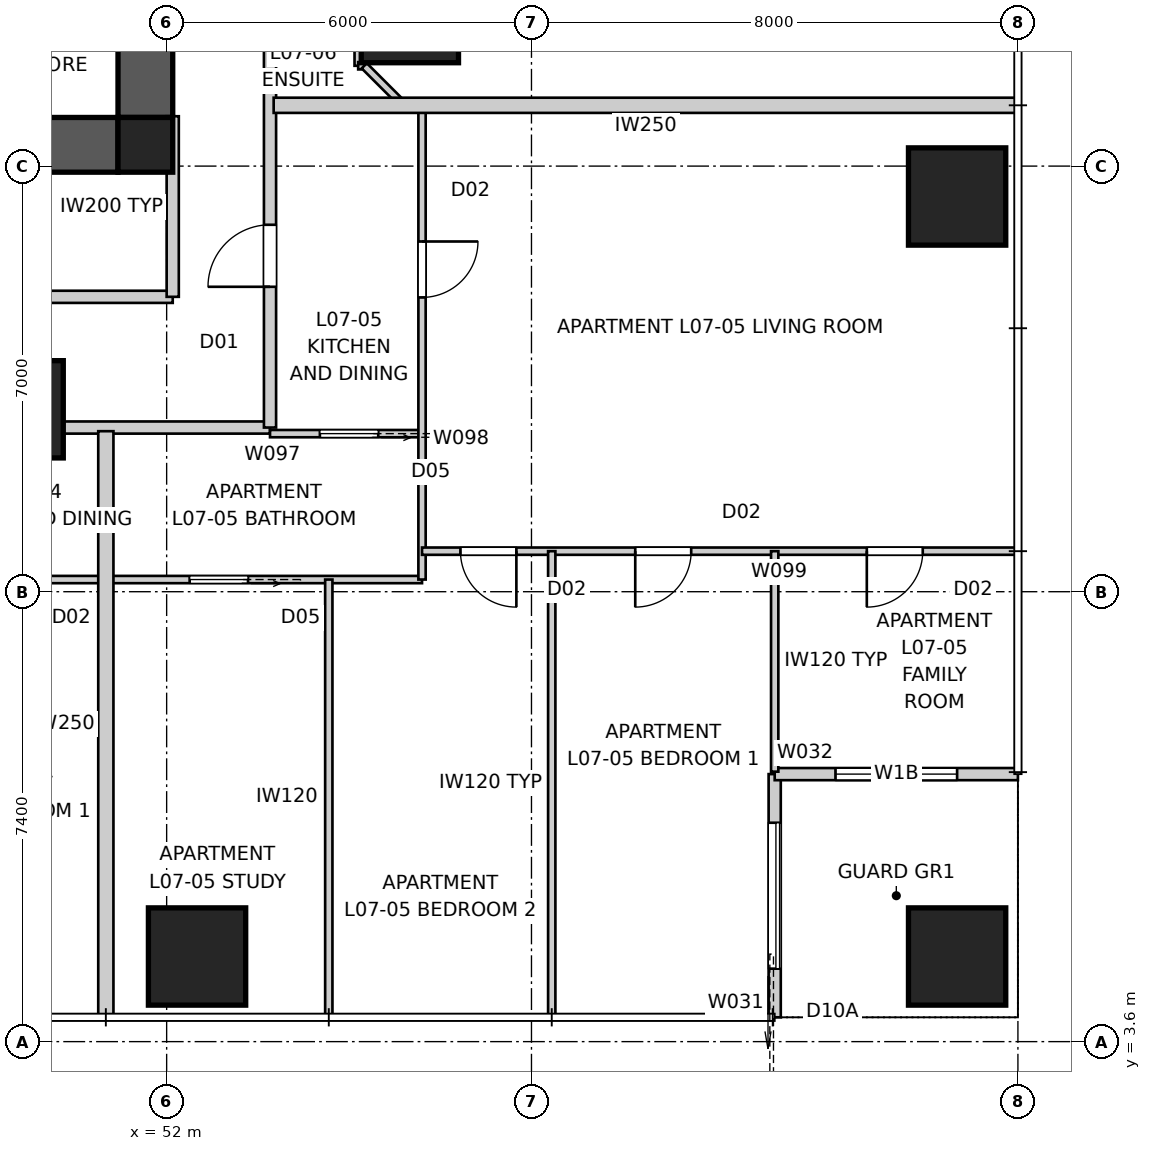
"""IFC4 building model, lengths in metres.
Left out: names, types, materials, properties, quantities, classifications, styles, units other than length and angle.
Written with IfcOpenShell. Run it as: python <this file> out.ifc"""

import sys

from ifc_helpers import new_model, si_unit, direction, frame, frame_2d, origin, origin_2d, place, context, subcontext, project, spatial, polyline, rectangle, outline, extrude, element, fill, save


model = new_model("IFC4")
c1 = context("Model", 3, precision=1e-05, world=origin(), true_north=direction((0.0, 1.0)))
c2 = subcontext(c1, "Body", "Model", "MODEL_VIEW")
j1 = project(units=[si_unit("LENGTHUNIT", "METRE"), si_unit("PLANEANGLEUNIT", "RADIAN")], contexts=[c1])
p1 = place(None, origin())
s1 = spatial("IfcSite", under=j1, at=p1, CompositionType="ELEMENT")
p2 = place(p1, origin())
s2 = spatial("IfcBuilding", under=s1, at=p2, CompositionType="ELEMENT")
p3 = place(p2, frame((0.0, 0.0, 28.6)))
s3 = spatial("IfcBuildingStorey", under=s2, at=p3, CompositionType="ELEMENT", Elevation=28.6)
p4 = place(p3, frame((51.2, 18.35, 0.0), z_axis=(0.0, 0.0, 1.0), x_axis=(-1.0, 0.0, 0.0)))
e1 = element("IfcWall", 1, at=p4, inside=s3, PredefinedType="SHEAR", context=c2, shape_type="SweptSolid", body=[
    extrude(outline(polyline([(0.0, -0.45), (22.4, -0.45), (22.4, -0.025), (22.85, -0.025), (22.85, 0.025), (22.4, 0.025), (22.4, 0.45), (0.0, 0.45), (0.0, 0.025), (-0.45, 0.025), (-0.45, -0.025), (0.0, -0.025), (0.0, -0.45)])), origin(), (0.0, 0.0, 1.0), 3.4),
])
p5 = place(p3, frame((51.65, 18.8, 0.0), z_axis=(0.0, 0.0, 1.0), x_axis=(0.0, 1.0, 0.0)))
e2 = element("IfcWall", 2, at=p5, inside=s3, PredefinedType="SHEAR", context=c2, shape_type="SweptSolid", body=[
    extrude(outline(polyline([(0.0, -0.45), (22.4, -0.45), (22.4, -0.025), (22.85, -0.025), (22.85, 0.025), (22.4, 0.025), (22.4, 0.45), (0.0, 0.45), (0.0, 0.025), (-0.45, 0.025), (-0.45, -0.025), (0.0, -0.025), (0.0, -0.45)])), origin(), (0.0, 0.0, 1.0), 3.4),
])
p6 = place(p5, frame((11.14, 0.0, 0.0)))
e3 = element("IfcOpeningElement", 3, at=p6, cuts=e2, PredefinedType="OPENING", context=c2, shape_type="SweptSolid", body=[
    extrude(rectangle(XDim=1.02, YDim=2.4, at=frame_2d((0.51, 1.2))), frame((0.0, 0.46, 0.0), z_axis=(0.0, -1.0, 0.0), x_axis=(1.0, 0.0, 0.0)), (0.0, 0.0, 1.0), 0.92),
])
p7 = place(p3, frame((51.65, 18.35, 0.0), z_axis=(0.0, 0.0, 1.0), x_axis=(1.0, 0.0, 0.0)))
e4 = element("IfcColumn", 4, at=p7, inside=s3, PredefinedType="COLUMN", context=c2, shape_type="SweptSolid", body=[
    extrude(rectangle(XDim=0.9, YDim=0.9, at=origin_2d()), origin(), (0.0, 0.0, 1.0), 3.4),
])
for number, where, z_axis, x_axis in (
    (5, (52.5, 5.0, 0.0), (0.0, 0.0, 1.0), (1.0, 0.0, 0.0)),
    (6, (65.0, 5.0, 0.0), (0.0, 0.0, 1.0), (1.0, 0.0, 0.0)),
    (7, (65.0, 17.5, 0.0), (0.0, 0.0, 1.0), (1.0, 0.0, 0.0)),
    (8, (49.5, 14.0, 0.0), (0.0, 0.0, 1.0), (1.0, 0.0, 0.0)),
    (9, (56.0, 20.5, 0.0), (0.0, 0.0, 1.0), (1.0, 0.0, 0.0)),
):
    element("IfcColumn", number, at=place(p3, frame(where, z_axis=z_axis, x_axis=x_axis)), inside=s3, PredefinedType="COLUMN", context=c2, shape_type="SweptSolid", body=[
        extrude(rectangle(XDim=1.6, YDim=1.6, at=origin_2d()), origin(), (0.0, 0.0, 1.0), 3.4),
    ])
p8 = place(p3, frame((62.0, 4.0, 0.0), z_axis=(0.0, 0.0, 1.0), x_axis=(0.0, 1.0, 0.0)))
e10 = element("IfcWall", 10, at=p8, inside=s3, PredefinedType="SOLIDWALL", context=c2, shape_type="SweptSolid", body=[
    extrude(rectangle(XDim=4.0, YDim=0.2, at=frame_2d((2.0, 0.0))), origin(), (0.0, 0.0, 1.0), 3.25),
])
p9 = place(p8, frame((0.8, 0.0, 0.0)))
e11 = element("IfcOpeningElement", 11, at=p9, cuts=e10, PredefinedType="OPENING", context=c2, shape_type="SweptSolid", body=[
    extrude(rectangle(XDim=2.4, YDim=2.1, at=frame_2d((1.2, 1.05))), frame((0.0, 0.11, 0.0), z_axis=(0.0, -1.0, 0.0), x_axis=(1.0, 0.0, 0.0)), (0.0, 0.0, 1.0), 0.22),
])
p10 = place(p3, frame((62.0, 8.0, 0.0), z_axis=(0.0, 0.0, 1.0), x_axis=(1.0, 0.0, 0.0)))
e12 = element("IfcWall", 12, at=p10, inside=s3, PredefinedType="SOLIDWALL", context=c2, shape_type="SweptSolid", body=[
    extrude(rectangle(XDim=4.0, YDim=0.2, at=frame_2d((2.0, 0.0))), origin(), (0.0, 0.0, 1.0), 3.25),
])
p11 = place(p10, frame((1.0, 0.0, 0.45)))
e13 = element("IfcOpeningElement", 13, at=p11, cuts=e12, PredefinedType="OPENING", context=c2, shape_type="SweptSolid", body=[
    extrude(rectangle(XDim=2.0, YDim=1.8, at=frame_2d((1.0, 0.9))), frame((0.0, 0.11, 0.0), z_axis=(0.0, -1.0, 0.0), x_axis=(1.0, 0.0, 0.0)), (0.0, 0.0, 1.0), 0.22),
])
p12 = place(p3, frame((49.242, 13.7, 0.0), z_axis=(0.0, 0.0, 1.0), x_axis=(1.0, 0.0, 0.0)))
e14 = element("IfcWall", 14, at=p12, inside=s3, PredefinedType="PARTITIONING", context=c2, shape_type="SweptSolid", body=[
    extrude(rectangle(XDim=4.458, YDim=0.2, at=frame_2d((2.229, 0.0))), origin(), (0.0, 0.0, 1.0), 3.25),
])
p13 = place(p3, frame((53.7, 13.7, 0.0), z_axis=(0.0, 0.0, 1.0), x_axis=(0.0, 1.0, 0.0)))
e15 = element("IfcWall", 15, at=p13, inside=s3, PredefinedType="PARTITIONING", context=c2, shape_type="SweptSolid", body=[
    extrude(rectangle(XDim=32.6, YDim=0.2, at=frame_2d((16.3, 0.0))), origin(), (0.0, 0.0, 1.0), 3.25),
])
p14 = place(p13, frame((2.315, 0.0, 0.0)))
e16 = element("IfcOpeningElement", 16, at=p14, cuts=e15, PredefinedType="OPENING", context=c2, shape_type="SweptSolid", body=[
    extrude(rectangle(XDim=1.02, YDim=2.34, at=frame_2d((0.51, 1.17))), frame((0.0, 0.11, 0.0), z_axis=(0.0, -1.0, 0.0), x_axis=(1.0, 0.0, 0.0)), (0.0, 0.0, 1.0), 0.22),
])
p15 = place(p13, frame((29.265, 0.0, 0.0)))
e17 = element("IfcOpeningElement", 17, at=p15, cuts=e15, PredefinedType="OPENING", context=c2, shape_type="SweptSolid", body=[
    extrude(rectangle(XDim=1.02, YDim=2.34, at=frame_2d((0.51, 1.17))), frame((0.0, 0.11, 0.0), z_axis=(0.0, -1.0, 0.0), x_axis=(1.0, 0.0, 0.0)), (0.0, 0.0, 1.0), 0.22),
])
p16 = place(p13, frame((20.646, 0.0, 0.0)))
e18 = element("IfcOpeningElement", 18, at=p16, cuts=e15, PredefinedType="OPENING", context=c2, shape_type="SweptSolid", body=[
    extrude(rectangle(XDim=1.02, YDim=2.34, at=frame_2d((0.51, 1.17))), frame((0.0, 0.11, 0.0), z_axis=(0.0, -1.0, 0.0), x_axis=(1.0, 0.0, 0.0)), (0.0, 0.0, 1.0), 0.22),
])
p17 = place(p13, frame((13.626, 0.0, 0.0)))
e19 = element("IfcOpeningElement", 19, at=p17, cuts=e15, PredefinedType="OPENING", context=c2, shape_type="SweptSolid", body=[
    extrude(rectangle(XDim=1.02, YDim=2.34, at=frame_2d((0.51, 1.17))), frame((0.0, 0.11, 0.0), z_axis=(0.0, -1.0, 0.0), x_axis=(1.0, 0.0, 0.0)), (0.0, 0.0, 1.0), 0.22),
])
p18 = place(p3, frame((51.0, 4.0, 0.0), z_axis=(0.0, 0.0, 1.0), x_axis=(0.0, 1.0, 0.0)))
e20 = element("IfcWall", 20, at=p18, inside=s3, PredefinedType="PARTITIONING", context=c2, shape_type="SweptSolid", body=[
    extrude(rectangle(XDim=9.64, YDim=0.25, at=frame_2d((4.82, 0.0))), origin(), (0.0, 0.0, 1.0), 3.25),
])
p19 = place(p3, frame((66.0, 19.0, 0.0), z_axis=(0.0, 0.0, 1.0), x_axis=(-1.0, 0.0, 0.0)))
e21 = element("IfcWall", 21, at=p19, inside=s3, PredefinedType="PARTITIONING", context=c2, shape_type="SweptSolid", body=[
    extrude(rectangle(XDim=12.24, YDim=0.25, at=frame_2d((6.12, 0.0))), origin(), (0.0, 0.0, 1.0), 3.25),
])
p20 = place(p3, frame((27.9, 15.85, 0.0), z_axis=(0.0, 0.0, 1.0), x_axis=(1.0, 0.0, 0.0)))
e22 = element("IfcWall", 22, at=p20, inside=s3, PredefinedType="PARTITIONING", context=c2, shape_type="SweptSolid", body=[
    extrude(rectangle(XDim=24.2, YDim=0.2, at=frame_2d((12.1, 0.0))), origin(), (0.0, 0.0, 1.0), 3.25),
])
p21 = place(p20, frame((12.437, 0.0, 0.0)))
e23 = element("IfcOpeningElement", 23, at=p21, cuts=e22, PredefinedType="OPENING", context=c2, shape_type="SweptSolid", body=[
    extrude(rectangle(XDim=1.02, YDim=2.1, at=frame_2d((0.51, 1.05))), frame((0.0, 0.11, 0.0), z_axis=(0.0, -1.0, 0.0), x_axis=(1.0, 0.0, 0.0)), (0.0, 0.0, 1.0), 0.22),
])
p22 = place(p20, frame((3.544, 0.0, 0.0)))
e24 = element("IfcOpeningElement", 24, at=p22, cuts=e22, PredefinedType="OPENING", context=c2, shape_type="SweptSolid", body=[
    extrude(rectangle(XDim=1.02, YDim=2.1, at=frame_2d((0.51, 1.05))), frame((0.0, 0.11, 0.0), z_axis=(0.0, -1.0, 0.0), x_axis=(1.0, 0.0, 0.0)), (0.0, 0.0, 1.0), 0.22),
])
p23 = place(p20, frame((19.733, 0.0, 0.0)))
e25 = element("IfcOpeningElement", 25, at=p23, cuts=e22, PredefinedType="OPENING", context=c2, shape_type="SweptSolid", body=[
    extrude(rectangle(XDim=1.02, YDim=2.1, at=frame_2d((0.51, 1.05))), frame((0.0, 0.11, 0.0), z_axis=(0.0, -1.0, 0.0), x_axis=(1.0, 0.0, 0.0)), (0.0, 0.0, 1.0), 0.22),
])
p24 = place(p3, frame((52.1, 15.85, 0.0), z_axis=(0.0, 0.0, 1.0), x_axis=(0.0, 1.0, 0.0)))
e26 = element("IfcWall", 26, at=p24, inside=s3, PredefinedType="PARTITIONING", context=c2, shape_type="SweptSolid", body=[
    extrude(rectangle(XDim=2.97, YDim=0.2, at=frame_2d((1.485, 0.0))), origin(), (0.0, 0.0, 1.0), 3.25),
])
p25 = place(p3, frame((56.2, 11.2, 0.0), z_axis=(0.0, 0.0, 1.0), x_axis=(-1.0, 0.0, 0.0)))
e27 = element("IfcWall", 27, at=p25, inside=s3, PredefinedType="PARTITIONING", context=c2, shape_type="SweptSolid", body=[
    extrude(rectangle(XDim=32.4, YDim=0.12, at=frame_2d((16.2, 0.0))), origin(), (0.0, 0.0, 1.0), 3.25),
])
p26 = place(p25, frame((24.882, 0.0, 0.0)))
e28 = element("IfcOpeningElement", 28, at=p26, cuts=e27, PredefinedType="OPENING", context=c2, shape_type="SweptSolid", body=[
    extrude(rectangle(XDim=0.92, YDim=2.34, at=frame_2d((0.46, 1.17))), frame((0.0, 0.07, 0.0), z_axis=(0.0, -1.0, 0.0), x_axis=(1.0, 0.0, 0.0)), (0.0, 0.0, 1.0), 0.14),
])
p27 = place(p25, frame((22.477, 0.0, 0.0)))
e29 = element("IfcOpeningElement", 29, at=p27, cuts=e27, PredefinedType="OPENING", context=c2, shape_type="SweptSolid", body=[
    extrude(rectangle(XDim=0.92, YDim=2.34, at=frame_2d((0.46, 1.17))), frame((0.0, 0.07, 0.0), z_axis=(0.0, -1.0, 0.0), x_axis=(1.0, 0.0, 0.0)), (0.0, 0.0, 1.0), 0.14),
])
p28 = place(p25, frame((6.598, 0.0, 0.0)))
e30 = element("IfcOpeningElement", 30, at=p28, cuts=e27, PredefinedType="OPENING", context=c2, shape_type="SweptSolid", body=[
    extrude(rectangle(XDim=0.92, YDim=2.34, at=frame_2d((0.46, 1.17))), frame((0.0, 0.07, 0.0), z_axis=(0.0, -1.0, 0.0), x_axis=(1.0, 0.0, 0.0)), (0.0, 0.0, 1.0), 0.14),
])
p29 = place(p25, frame((28.598, 0.0, 0.0)))
e31 = element("IfcOpeningElement", 31, at=p29, cuts=e27, PredefinedType="OPENING", context=c2, shape_type="SweptSolid", body=[
    extrude(rectangle(XDim=0.92, YDim=2.34, at=frame_2d((0.46, 1.17))), frame((0.0, 0.07, 0.0), z_axis=(0.0, -1.0, 0.0), x_axis=(1.0, 0.0, 0.0)), (0.0, 0.0, 1.0), 0.14),
])
p30 = place(p25, frame((2.862, 0.0, 0.0)))
e32 = element("IfcOpeningElement", 32, at=p30, cuts=e27, PredefinedType="OPENING", context=c2, shape_type="SweptSolid", body=[
    extrude(rectangle(XDim=0.96, YDim=2.1, at=frame_2d((0.48, 1.05))), frame((0.0, 0.07, 0.0), z_axis=(0.0, -1.0, 0.0), x_axis=(1.0, 0.0, 0.0)), (0.0, 0.0, 1.0), 0.14),
])
p31 = place(p25, frame((10.363, 0.0, 0.0)))
e33 = element("IfcOpeningElement", 33, at=p31, cuts=e27, PredefinedType="OPENING", context=c2, shape_type="SweptSolid", body=[
    extrude(rectangle(XDim=0.96, YDim=2.1, at=frame_2d((0.48, 1.05))), frame((0.0, 0.07, 0.0), z_axis=(0.0, -1.0, 0.0), x_axis=(1.0, 0.0, 0.0)), (0.0, 0.0, 1.0), 0.14),
])
p32 = place(p25, frame((13.862, 0.0, 0.0)))
e34 = element("IfcOpeningElement", 34, at=p32, cuts=e27, PredefinedType="OPENING", context=c2, shape_type="SweptSolid", body=[
    extrude(rectangle(XDim=0.96, YDim=2.1, at=frame_2d((0.48, 1.05))), frame((0.0, 0.07, 0.0), z_axis=(0.0, -1.0, 0.0), x_axis=(1.0, 0.0, 0.0)), (0.0, 0.0, 1.0), 0.14),
])
p33 = place(p25, frame((17.529, 0.0, 0.0)))
e35 = element("IfcOpeningElement", 35, at=p33, cuts=e27, PredefinedType="OPENING", context=c2, shape_type="SweptSolid", body=[
    extrude(rectangle(XDim=0.96, YDim=2.1, at=frame_2d((0.48, 1.05))), frame((0.0, 0.07, 0.0), z_axis=(0.0, -1.0, 0.0), x_axis=(1.0, 0.0, 0.0)), (0.0, 0.0, 1.0), 0.14),
])
p34 = place(p3, frame((56.2, 13.6, 0.0), z_axis=(0.0, 0.0, 1.0), x_axis=(-1.0, 0.0, 0.0)))
e36 = element("IfcWall", 36, at=p34, inside=s3, PredefinedType="PARTITIONING", context=c2, shape_type="SweptSolid", body=[
    extrude(rectangle(XDim=2.5, YDim=0.12, at=frame_2d((1.25, 0.0))), origin(), (0.0, 0.0, 1.0), 3.25),
])
p35 = place(p34, frame((0.72, 0.0, 0.0)))
e37 = element("IfcOpeningElement", 37, at=p35, cuts=e36, PredefinedType="OPENING", context=c2, shape_type="SweptSolid", body=[
    extrude(rectangle(XDim=0.96, YDim=2.1, at=frame_2d((0.48, 1.05))), frame((0.0, 0.07, 0.0), z_axis=(0.0, -1.0, 0.0), x_axis=(1.0, 0.0, 0.0)), (0.0, 0.0, 1.0), 0.14),
])
p36 = place(p3, frame((56.2, 19.0, 0.0), z_axis=(0.0, 0.0, 1.0), x_axis=(0.0, -1.0, 0.0)))
e38 = element("IfcWall", 38, at=p36, inside=s3, PredefinedType="PARTITIONING", context=c2, shape_type="SweptSolid", body=[
    extrude(rectangle(XDim=7.8, YDim=0.12, at=frame_2d((3.9, 0.0))), origin(), (0.0, 0.0, 1.0), 3.25),
])
p37 = place(p36, frame((2.24, 0.0, 0.0)))
e39 = element("IfcOpeningElement", 39, at=p37, cuts=e38, PredefinedType="OPENING", context=c2, shape_type="SweptSolid", body=[
    extrude(rectangle(XDim=0.92, YDim=2.34, at=frame_2d((0.46, 1.17))), frame((0.0, 0.07, 0.0), z_axis=(0.0, -1.0, 0.0), x_axis=(1.0, 0.0, 0.0)), (0.0, 0.0, 1.0), 0.14),
])
p38 = place(p3, frame((65.96, 11.667, 0.0), z_axis=(0.0, 0.0, 1.0), x_axis=(-1.0, 0.0, 0.0)))
e40 = element("IfcWall", 40, at=p38, inside=s3, PredefinedType="PARTITIONING", context=c2, shape_type="SweptSolid", body=[
    extrude(rectangle(XDim=9.76, YDim=0.12, at=frame_2d((4.88, 0.0))), origin(), (0.0, 0.0, 1.0), 3.25),
])
p39 = place(p38, frame((1.525, 0.0, 0.0)))
e41 = element("IfcOpeningElement", 41, at=p39, cuts=e40, PredefinedType="OPENING", context=c2, shape_type="SweptSolid", body=[
    extrude(rectangle(XDim=0.92, YDim=2.34, at=frame_2d((0.46, 1.17))), frame((0.0, 0.07, 0.0), z_axis=(0.0, -1.0, 0.0), x_axis=(1.0, 0.0, 0.0)), (0.0, 0.0, 1.0), 0.14),
])
p40 = place(p38, frame((5.333, 0.0, 0.0)))
e42 = element("IfcOpeningElement", 42, at=p40, cuts=e40, PredefinedType="OPENING", context=c2, shape_type="SweptSolid", body=[
    extrude(rectangle(XDim=0.92, YDim=2.34, at=frame_2d((0.46, 1.17))), frame((0.0, 0.07, 0.0), z_axis=(0.0, -1.0, 0.0), x_axis=(1.0, 0.0, 0.0)), (0.0, 0.0, 1.0), 0.14),
])
p41 = place(p38, frame((8.208, 0.0, 0.0)))
e43 = element("IfcOpeningElement", 43, at=p41, cuts=e40, PredefinedType="OPENING", context=c2, shape_type="SweptSolid", body=[
    extrude(rectangle(XDim=0.92, YDim=2.34, at=frame_2d((0.46, 1.17))), frame((0.0, 0.07, 0.0), z_axis=(0.0, -1.0, 0.0), x_axis=(1.0, 0.0, 0.0)), (0.0, 0.0, 1.0), 0.14),
])
p42 = place(p3, frame((58.333, 4.04, 0.0), z_axis=(0.0, 0.0, 1.0), x_axis=(0.0, 1.0, 0.0)))
e44 = element("IfcWall", 44, at=p42, inside=s3, PredefinedType="PARTITIONING", context=c2, shape_type="SweptSolid", body=[
    extrude(rectangle(XDim=7.627, YDim=0.12, at=frame_2d((3.813, 0.0))), origin(), (0.0, 0.0, 1.0), 3.25),
])
p43 = place(p3, frame((62.0, 11.667, 0.0), z_axis=(0.0, 0.0, 1.0), x_axis=(0.0, -1.0, 0.0)))
e45 = element("IfcWall", 45, at=p43, inside=s3, PredefinedType="PARTITIONING", context=c2, shape_type="SweptSolid", body=[
    extrude(rectangle(XDim=3.627, YDim=0.12, at=frame_2d((1.813, 0.0))), origin(), (0.0, 0.0, 1.0), 3.25),
])
p44 = place(p3, frame((54.667, 4.04, 0.0), z_axis=(0.0, 0.0, 1.0), x_axis=(0.0, 1.0, 0.0)))
e46 = element("IfcWall", 46, at=p44, inside=s3, PredefinedType="PARTITIONING", context=c2, shape_type="SweptSolid", body=[
    extrude(rectangle(XDim=7.16, YDim=0.12, at=frame_2d((3.58, 0.0))), origin(), (0.0, 0.0, 1.0), 2.638),
])
p45 = place(p3, frame((55.15, 21.35, 0.0), z_axis=(0.0, 0.0, 1.0), x_axis=(0.0, -1.0, 0.0)))
e47 = element("IfcWall", 47, at=p45, inside=s3, PredefinedType="PARTITIONING", context=c2, shape_type="SweptSolid", body=[
    extrude(rectangle(XDim=1.7, YDim=0.12, at=frame_2d((0.85, 0.0))), origin(), (0.0, 0.0, 1.0), 3.25),
])
p46 = place(p3, frame((55.25, 19.65, 0.0), z_axis=(0.0, 0.0, 1.0), x_axis=(0.707106781187, -0.707106781187, 0.0)))
e48 = element("IfcWall", 48, at=p46, inside=s3, PredefinedType="PARTITIONING", context=c2, shape_type="SweptSolid", body=[
    extrude(rectangle(XDim=0.919, YDim=0.12, at=frame_2d((0.459, 0.0))), origin(), (0.0, 0.0, 1.0), 3.25),
])
p47 = place(p3, frame((55.15, 19.65, 0.0), z_axis=(0.0, 0.0, 1.0), x_axis=(1.0, 0.0, 0.0)))
e49 = element("IfcWall", 49, at=p47, inside=s3, PredefinedType="PARTITIONING", context=c2, shape_type="SweptSolid", body=[
    extrude(rectangle(XDim=0.1, YDim=0.12, at=frame_2d((0.05, 0.0))), origin(), (0.0, 0.0, 1.0), 3.25),
])
p48 = place(p9, origin())
e50 = element("IfcDoor", 50, at=p48, inside=s3, OperationType="SLIDING_TO_LEFT", PredefinedType="DOOR", context=c2, shape_type="SweptSolid", body=[
    extrude(rectangle(XDim=2.4, YDim=2.1, at=frame_2d((1.2, 1.05))), frame((0.0, 0.025, 0.0), z_axis=(0.0, -1.0, 0.0), x_axis=(1.0, 0.0, 0.0)), (0.0, 0.0, 1.0), 0.05),
])
fill(e11, e50)
p49 = place(p11, origin())
e51 = element("IfcWindow", 51, at=p49, inside=s3, PartitioningType="SINGLE_PANEL", PredefinedType="WINDOW", context=c2, shape_type="SweptSolid", body=[
    extrude(rectangle(XDim=2.0, YDim=1.8, at=frame_2d((1.0, 0.9))), frame((0.0, 0.03, 0.0), z_axis=(0.0, -1.0, 0.0), x_axis=(1.0, 0.0, 0.0)), (0.0, 0.0, 1.0), 0.06),
])
fill(e13, e51)
p50 = place(p14, origin())
e52 = element("IfcDoor", 52, at=p50, inside=s3, OperationType="SINGLE_SWING_LEFT", PredefinedType="DOOR", context=c2, shape_type="SweptSolid", body=[
    extrude(rectangle(XDim=1.02, YDim=2.34, at=frame_2d((0.51, 1.17))), frame((0.0, 0.025, 0.0), z_axis=(0.0, -1.0, 0.0), x_axis=(1.0, 0.0, 0.0)), (0.0, 0.0, 1.0), 0.05),
])
fill(e16, e52)
p51 = place(p37, origin())
e53 = element("IfcDoor", 53, at=p51, inside=s3, OperationType="SINGLE_SWING_LEFT", PredefinedType="DOOR", context=c2, shape_type="SweptSolid", body=[
    extrude(rectangle(XDim=0.92, YDim=2.34, at=frame_2d((0.46, 1.17))), frame((0.0, 0.025, 0.0), z_axis=(0.0, -1.0, 0.0), x_axis=(1.0, 0.0, 0.0)), (0.0, 0.0, 1.0), 0.05),
])
fill(e39, e53)
p52 = place(p35, origin())
e54 = element("IfcDoor", 54, at=p52, inside=s3, OperationType="SLIDING_TO_LEFT", PredefinedType="DOOR", context=c2, shape_type="SweptSolid", body=[
    extrude(rectangle(XDim=0.96, YDim=2.1, at=frame_2d((0.48, 1.05))), frame((0.0, 0.025, 0.0), z_axis=(0.0, -1.0, 0.0), x_axis=(1.0, 0.0, 0.0)), (0.0, 0.0, 1.0), 0.05),
])
fill(e37, e54)
p53 = place(p39, origin())
e55 = element("IfcDoor", 55, at=p53, inside=s3, OperationType="SINGLE_SWING_RIGHT", PredefinedType="DOOR", context=c2, shape_type="SweptSolid", body=[
    extrude(rectangle(XDim=0.92, YDim=2.34, at=frame_2d((0.46, 1.17))), frame((0.0, 0.025, 0.0), z_axis=(0.0, -1.0, 0.0), x_axis=(1.0, 0.0, 0.0)), (0.0, 0.0, 1.0), 0.05),
])
fill(e41, e55)
p54 = place(p40, origin())
e56 = element("IfcDoor", 56, at=p54, inside=s3, OperationType="SINGLE_SWING_RIGHT", PredefinedType="DOOR", context=c2, shape_type="SweptSolid", body=[
    extrude(rectangle(XDim=0.92, YDim=2.34, at=frame_2d((0.46, 1.17))), frame((0.0, 0.025, 0.0), z_axis=(0.0, -1.0, 0.0), x_axis=(1.0, 0.0, 0.0)), (0.0, 0.0, 1.0), 0.05),
])
fill(e42, e56)
p55 = place(p41, origin())
e57 = element("IfcDoor", 57, at=p55, inside=s3, OperationType="SINGLE_SWING_LEFT", PredefinedType="DOOR", context=c2, shape_type="SweptSolid", body=[
    extrude(rectangle(XDim=0.92, YDim=2.34, at=frame_2d((0.46, 1.17))), frame((0.0, 0.025, 0.0), z_axis=(0.0, -1.0, 0.0), x_axis=(1.0, 0.0, 0.0)), (0.0, 0.0, 1.0), 0.05),
])
fill(e43, e57)
p56 = place(p30, origin())
e58 = element("IfcDoor", 58, at=p56, inside=s3, OperationType="SLIDING_TO_LEFT", PredefinedType="DOOR", context=c2, shape_type="SweptSolid", body=[
    extrude(rectangle(XDim=0.96, YDim=2.1, at=frame_2d((0.48, 1.05))), frame((0.0, 0.025, 0.0), z_axis=(0.0, -1.0, 0.0), x_axis=(1.0, 0.0, 0.0)), (0.0, 0.0, 1.0), 0.05),
])
fill(e32, e58)
save(model, sys.argv[1])
